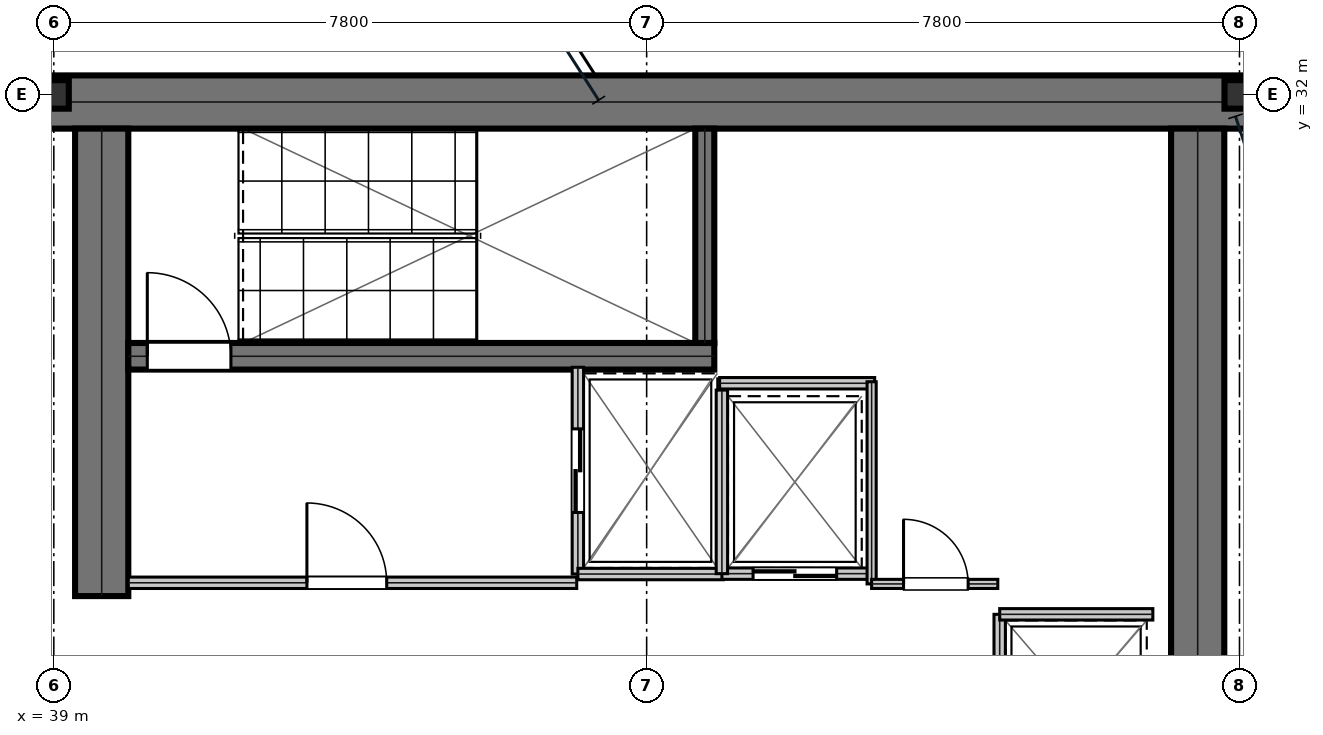
"""IFC4 building model, lengths in metres.
Left out: names, types, materials, properties, quantities, classifications, styles, units other than length and angle.
Written with IfcOpenShell. Run it as: python <this file> out.ifc"""

import sys

from ifc_helpers import new_model, si_unit, direction, frame, frame_2d, origin, origin_2d, place, context, subcontext, project, spatial, rectangle, i_section, extrude, element, fill, save


model = new_model("IFC4")
c1 = context("Model", 3, precision=1e-05, world=origin(), true_north=direction((0.0, 1.0)))
c2 = subcontext(c1, "Body", "Model", "MODEL_VIEW")
j1 = project(units=[si_unit("LENGTHUNIT", "METRE"), si_unit("PLANEANGLEUNIT", "RADIAN")], contexts=[c1])
p1 = place(None, origin())
s1 = spatial("IfcSite", under=j1, at=p1, CompositionType="ELEMENT")
p2 = place(p1, origin())
s2 = spatial("IfcBuilding", under=s1, at=p2, CompositionType="ELEMENT")
p3 = place(p2, frame((0.0, 0.0, 199.95)))
s3 = spatial("IfcBuildingStorey", under=s2, at=p3, CompositionType="ELEMENT", Elevation=199.95)
p4 = place(p3, frame((38.8, 31.9, 0.0), z_axis=(0.0, 0.0, 1.0), x_axis=(1.0, 0.0, 0.0)))
e1 = element("IfcWall", 1, at=p4, inside=s3, PredefinedType="SHEAR", context=c2, shape_type="SweptSolid", body=[
    extrude(rectangle(XDim=16.0, YDim=0.7, at=frame_2d((8.0, 0.0))), origin(), (0.0, 0.0, 1.0), 3.79),
])
p5 = place(p3, frame((39.63, 25.4, 0.0), z_axis=(0.0, 0.0, 1.0), x_axis=(0.0, 1.0, 0.0)))
e2 = element("IfcWall", 2, at=p5, inside=s3, PredefinedType="SHEAR", context=c2, shape_type="SweptSolid", body=[
    extrude(rectangle(XDim=6.15, YDim=0.7, at=frame_2d((3.075, 0.0))), origin(), (0.0, 0.0, 1.0), 3.79),
])
p6 = place(p3, frame((54.05, 16.45, 0.0), z_axis=(0.0, 0.0, 1.0), x_axis=(0.0, 1.0, 0.0)))
e3 = element("IfcWall", 3, at=p6, inside=s3, PredefinedType="SHEAR", context=c2, shape_type="SweptSolid", body=[
    extrude(rectangle(XDim=15.1, YDim=0.7, at=frame_2d((7.55, 0.0))), origin(), (0.0, 0.0, 1.0), 3.79),
])
p7 = place(p3, frame((39.98, 28.555, 0.0), z_axis=(0.0, 0.0, 1.0), x_axis=(1.0, 0.0, 0.0)))
e4 = element("IfcWall", 4, at=p7, inside=s3, PredefinedType="SHEAR", context=c2, shape_type="SweptSolid", body=[
    extrude(rectangle(XDim=7.71, YDim=0.35, at=frame_2d((3.855, 0.0))), origin(), (0.0, 0.0, 1.0), 3.79),
])
p8 = place(p7, frame((0.25, 0.0, 0.0)))
e5 = element("IfcOpeningElement", 5, at=p8, cuts=e4, PredefinedType="OPENING", context=c2, shape_type="SweptSolid", body=[
    extrude(rectangle(XDim=1.1, YDim=2.15, at=frame_2d((0.55, 1.075))), frame((0.0, 0.185, 0.0), z_axis=(0.0, -1.0, 0.0), x_axis=(1.0, 0.0, 0.0)), (0.0, 0.0, 1.0), 0.37),
])
p9 = place(p3, frame((47.565, 28.73, 0.0), z_axis=(0.0, 0.0, 1.0), x_axis=(0.0, 1.0, 0.0)))
e6 = element("IfcWall", 6, at=p9, inside=s3, PredefinedType="SHEAR", context=c2, shape_type="SweptSolid", body=[
    extrude(rectangle(XDim=2.82, YDim=0.25, at=frame_2d((1.41, 0.0))), origin(), (0.0, 0.0, 1.0), 3.79),
])
for number, where, z_axis, x_axis in (
    (7, (39.0, 32.0, 0.0), (0.0, 0.0, 1.0), (1.0, 0.0, 0.0)),
    (8, (54.6, 32.0, 0.0), (0.0, 0.0, 1.0), (1.0, 0.0, 0.0)),
):
    element("IfcColumn", number, at=place(p3, frame(where, z_axis=z_axis, x_axis=x_axis)), inside=s3, PredefinedType="COLUMN", context=c2, shape_type="SweptSolid", body=[
        extrude(i_section(OverallWidth=0.394, OverallDepth=0.375, WebThickness=0.017, FlangeThickness=0.028, at=origin_2d()), origin(), (0.0, 0.0, 1.0), 4.044),
    ])
p10 = place(p3, frame((39.98, 25.575, 0.0), z_axis=(0.0, 0.0, 1.0), x_axis=(1.0, 0.0, 0.0)))
e9 = element("IfcWall", 9, at=p10, inside=s3, PredefinedType="PARTITIONING", context=c2, shape_type="SweptSolid", body=[
    extrude(rectangle(XDim=5.9, YDim=0.15, at=frame_2d((2.95, 0.0))), origin(), (0.0, 0.0, 1.0), 3.79),
])
p11 = place(p10, frame((2.35, 0.0, 0.0)))
e10 = element("IfcOpeningElement", 10, at=p11, cuts=e9, PredefinedType="OPENING", context=c2, shape_type="SweptSolid", body=[
    extrude(rectangle(XDim=1.05, YDim=2.15, at=frame_2d((0.525, 1.075))), frame((0.0, 0.085, 0.0), z_axis=(0.0, -1.0, 0.0), x_axis=(1.0, 0.0, 0.0)), (0.0, 0.0, 1.0), 0.17),
])
p12 = place(p3, frame((45.895, 25.69, 0.0), z_axis=(0.0, 0.0, 1.0), x_axis=(0.0, 1.0, 0.0)))
e11 = element("IfcWall", 11, at=p12, inside=s3, PredefinedType="PARTITIONING", context=c2, shape_type="SweptSolid", body=[
    extrude(rectangle(XDim=2.72, YDim=0.15, at=frame_2d((1.36, 0.0))), origin(), (0.0, 0.0, 1.0), 3.79),
])
p13 = place(p12, frame((0.81, 0.0, 0.0)))
e12 = element("IfcOpeningElement", 12, at=p13, cuts=e11, PredefinedType="OPENING", context=c2, shape_type="SweptSolid", body=[
    extrude(rectangle(XDim=1.1, YDim=2.15, at=frame_2d((0.55, 1.075))), frame((0.0, 0.085, 0.0), z_axis=(0.0, -1.0, 0.0), x_axis=(1.0, 0.0, 0.0)), (0.0, 0.0, 1.0), 0.17),
])
p14 = place(p3, frame((45.895, 25.69, 0.0), z_axis=(0.0, 0.0, 1.0), x_axis=(1.0, 0.0, 0.0)))
e13 = element("IfcWall", 13, at=p14, inside=s3, PredefinedType="PARTITIONING", context=c2, shape_type="SweptSolid", body=[
    extrude(rectangle(XDim=1.915, YDim=0.15, at=frame_2d((0.958, 0.0))), origin(), (0.0, 0.0, 1.0), 3.79),
])
p15 = place(p3, frame((47.79, 25.695, 0.0), z_axis=(0.0, 0.0, 1.0), x_axis=(1.0, 0.0, 0.0)))
e14 = element("IfcWall", 14, at=p15, inside=s3, PredefinedType="PARTITIONING", context=c2, shape_type="SweptSolid", body=[
    extrude(rectangle(XDim=1.92, YDim=0.15, at=frame_2d((0.96, 0.0))), origin(), (0.0, 0.0, 1.0), 3.79),
])
p16 = place(p15, frame((0.41, 0.0, 0.0)))
e15 = element("IfcOpeningElement", 15, at=p16, cuts=e14, PredefinedType="OPENING", context=c2, shape_type="SweptSolid", body=[
    extrude(rectangle(XDim=1.1, YDim=2.15, at=frame_2d((0.55, 1.075))), frame((0.0, 0.085, 0.0), z_axis=(0.0, -1.0, 0.0), x_axis=(1.0, 0.0, 0.0)), (0.0, 0.0, 1.0), 0.17),
])
p17 = place(p3, frame((47.79, 25.695, 0.0), z_axis=(0.0, 0.0, 1.0), x_axis=(0.0, 1.0, 0.0)))
e16 = element("IfcWall", 16, at=p17, inside=s3, PredefinedType="PARTITIONING", context=c2, shape_type="SweptSolid", body=[
    extrude(rectangle(XDim=2.415, YDim=0.15, at=frame_2d((1.208, 0.0))), origin(), (0.0, 0.0, 1.0), 3.79),
])
p18 = place(p3, frame((51.445, 22.84, 0.0), z_axis=(0.0, 0.0, 1.0), x_axis=(0.0, 1.0, 0.0)))
e17 = element("IfcWall", 17, at=p18, inside=s3, PredefinedType="PARTITIONING", context=c2, shape_type="SweptSolid", body=[
    extrude(rectangle(XDim=2.32, YDim=0.15, at=frame_2d((1.16, 0.0))), origin(), (0.0, 0.0, 1.0), 3.79),
])
p19 = place(p18, frame((0.61, 0.0, 0.0)))
e18 = element("IfcOpeningElement", 18, at=p19, cuts=e17, PredefinedType="OPENING", context=c2, shape_type="SweptSolid", body=[
    extrude(rectangle(XDim=1.1, YDim=2.15, at=frame_2d((0.55, 1.075))), frame((0.0, 0.085, 0.0), z_axis=(0.0, -1.0, 0.0), x_axis=(1.0, 0.0, 0.0)), (0.0, 0.0, 1.0), 0.17),
])
p20 = place(p3, frame((51.445, 25.16, 0.0), z_axis=(0.0, 0.0, 1.0), x_axis=(1.0, 0.0, 0.0)))
e19 = element("IfcWall", 19, at=p20, inside=s3, PredefinedType="PARTITIONING", context=c2, shape_type="SweptSolid", body=[
    extrude(rectangle(XDim=2.015, YDim=0.15, at=frame_2d((1.007, 0.0))), origin(), (0.0, 0.0, 1.0), 3.79),
])
p21 = place(p3, frame((47.76, 28.2, 0.0), z_axis=(0.0, 0.0, 1.0), x_axis=(1.0, 0.0, 0.0)))
e20 = element("IfcWall", 20, at=p21, inside=s3, PredefinedType="PARTITIONING", context=c2, shape_type="SweptSolid", body=[
    extrude(rectangle(XDim=2.04, YDim=0.15, at=frame_2d((1.02, 0.0))), origin(), (0.0, 0.0, 1.0), 3.79),
])
p22 = place(p3, frame((49.76, 25.56, 0.0), z_axis=(0.0, 0.0, 1.0), x_axis=(0.0, 1.0, 0.0)))
e21 = element("IfcWall", 21, at=p22, inside=s3, PredefinedType="PARTITIONING", context=c2, shape_type="SweptSolid", body=[
    extrude(rectangle(XDim=2.66, YDim=0.12, at=frame_2d((1.33, 0.0))), origin(), (0.0, 0.0, 1.0), 3.79),
])
p23 = place(p3, frame((49.76, 25.56, 0.0), z_axis=(0.0, 0.0, 1.0), x_axis=(1.0, 0.0, 0.0)))
e22 = element("IfcWall", 22, at=p23, inside=s3, PredefinedType="PARTITIONING", context=c2, shape_type="SweptSolid", body=[
    extrude(rectangle(XDim=1.66, YDim=0.12, at=frame_2d((0.83, 0.0))), origin(), (0.0, 0.0, 1.0), 3.79),
])
p24 = place(p23, frame((0.42, 0.0, 0.0)))
e23 = element("IfcOpeningElement", 23, at=p24, cuts=e22, PredefinedType="OPENING", context=c2, shape_type="SweptSolid", body=[
    extrude(rectangle(XDim=0.85, YDim=2.15, at=frame_2d((0.425, 1.075))), frame((0.0, 0.07, 0.0), z_axis=(0.0, -1.0, 0.0), x_axis=(1.0, 0.0, 0.0)), (0.0, 0.0, 1.0), 0.14),
])
p25 = place(p11, origin())
e24 = element("IfcDoor", 24, at=p25, inside=s3, OperationType="SINGLE_SWING_LEFT", PredefinedType="DOOR", context=c2, shape_type="SweptSolid", body=[
    extrude(rectangle(XDim=1.05, YDim=2.15, at=frame_2d((0.525, 1.075))), frame((0.0, 0.025, 0.0), z_axis=(0.0, -1.0, 0.0), x_axis=(1.0, 0.0, 0.0)), (0.0, 0.0, 1.0), 0.05),
])
fill(e10, e24)
p26 = place(p13, frame((1.1, 0.0, 0.0), z_axis=(0.0, 0.0, 1.0), x_axis=(-1.0, 0.0, 0.0)))
e25 = element("IfcDoor", 25, at=p26, inside=s3, OperationType="DOUBLE_DOOR_SLIDING", PredefinedType="DOOR", context=c2, shape_type="SweptSolid", body=[
    extrude(rectangle(XDim=1.1, YDim=2.15, at=frame_2d((0.55, 1.075))), frame((0.0, 0.025, 0.0), z_axis=(0.0, -1.0, 0.0), x_axis=(1.0, 0.0, 0.0)), (0.0, 0.0, 1.0), 0.05),
])
fill(e12, e25)
p27 = place(p16, frame((1.1, 0.0, 0.0), z_axis=(0.0, 0.0, 1.0), x_axis=(-1.0, 0.0, 0.0)))
e26 = element("IfcDoor", 26, at=p27, inside=s3, OperationType="DOUBLE_DOOR_SLIDING", PredefinedType="DOOR", context=c2, shape_type="SweptSolid", body=[
    extrude(rectangle(XDim=1.1, YDim=2.15, at=frame_2d((0.55, 1.075))), frame((0.0, 0.025, 0.0), z_axis=(0.0, -1.0, 0.0), x_axis=(1.0, 0.0, 0.0)), (0.0, 0.0, 1.0), 0.05),
])
fill(e15, e26)
p28 = place(p24, origin())
e27 = element("IfcDoor", 27, at=p28, inside=s3, OperationType="SINGLE_SWING_LEFT", PredefinedType="DOOR", context=c2, shape_type="SweptSolid", body=[
    extrude(rectangle(XDim=0.85, YDim=2.15, at=frame_2d((0.425, 1.075))), frame((0.0, 0.025, 0.0), z_axis=(0.0, -1.0, 0.0), x_axis=(1.0, 0.0, 0.0)), (0.0, 0.0, 1.0), 0.05),
])
fill(e23, e27)
p29 = place(p8, origin())
e28 = element("IfcDoor", 28, at=p29, inside=s3, OperationType="SINGLE_SWING_LEFT", PredefinedType="DOOR", context=c2, shape_type="SweptSolid", body=[
    extrude(rectangle(XDim=1.1, YDim=2.15, at=frame_2d((0.55, 1.075))), frame((0.0, 0.025, 0.0), z_axis=(0.0, -1.0, 0.0), x_axis=(1.0, 0.0, 0.0)), (0.0, 0.0, 1.0), 0.05),
])
fill(e5, e28)
save(model, sys.argv[1])
